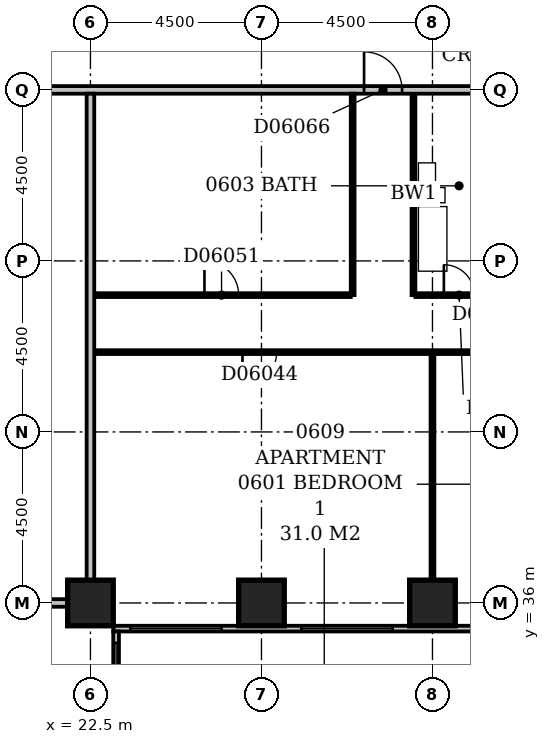
"""IFC4 building model, lengths in metres.
Left out: names, types, materials, properties, quantities, classifications, styles, units other than length and angle.
Written with IfcOpenShell. Run it as: python <this file> out.ifc"""

import sys

from ifc_helpers import new_model, si_unit, direction, frame, frame_2d, origin, origin_2d, place, context, subcontext, project, spatial, rectangle, extrude, element, fill, save


model = new_model("IFC4")
c1 = context("Model", 3, precision=1e-05, world=origin(), true_north=direction((0.0, 1.0)))
c2 = subcontext(c1, "Body", "Model", "MODEL_VIEW")
j1 = project(units=[si_unit("LENGTHUNIT", "METRE"), si_unit("PLANEANGLEUNIT", "RADIAN")], contexts=[c1])
p1 = place(None, origin())
s1 = spatial("IfcSite", under=j1, at=p1, CompositionType="ELEMENT")
p2 = place(p1, origin())
s2 = spatial("IfcBuilding", under=s1, at=p2, CompositionType="ELEMENT")
p3 = place(p2, frame((0.0, 0.0, 32.6)))
s3 = spatial("IfcBuildingStorey", under=s2, at=p3, CompositionType="ELEMENT", Elevation=32.6)
for number, where, z_axis, x_axis in (
    (1, (22.5, 36.0, -0.3), (0.0, 0.0, 1.0), (1.0, 0.0, 0.0)),
    (2, (27.0, 36.0, -0.3), (0.0, 0.0, 1.0), (1.0, 0.0, 0.0)),
    (3, (31.5, 36.0, -0.3), (0.0, 0.0, 1.0), (1.0, 0.0, 0.0)),
):
    element("IfcColumn", number, at=place(p3, frame(where, z_axis=z_axis, x_axis=x_axis)), inside=s3, PredefinedType="COLUMN", context=c2, shape_type="SweptSolid", body=[
        extrude(rectangle(XDim=1.2, YDim=1.2, at=origin_2d()), origin(), (0.0, 0.0, 1.0), 3.6),
    ])
p4 = place(p3, frame((23.175, 17.4, 0.0), z_axis=(0.0, 0.0, 1.0), x_axis=(0.0, 1.0, 0.0)))
e4 = element("IfcWall", 4, at=p4, inside=s3, PredefinedType="STANDARD", context=c2, shape_type="SweptSolid", body=[
    extrude(rectangle(XDim=17.85, YDim=0.15, at=frame_2d((8.925, 0.0))), origin(), (0.0, 0.0, 1.0), 2.7),
])
p5 = place(p4, frame((1.65, 0.0, 0.6)))
e5 = element("IfcOpeningElement", 5, at=p5, cuts=e4, PredefinedType="OPENING", context=c2, shape_type="SweptSolid", body=[
    extrude(rectangle(XDim=2.4, YDim=1.8, at=frame_2d((1.2, 0.9))), frame((0.0, 0.087, 0.0), z_axis=(0.0, -1.0, 0.0), x_axis=(1.0, 0.0, 0.0)), (0.0, 0.0, 1.0), 0.174),
])
p6 = place(p4, frame((6.15, 0.0, 0.6)))
e6 = element("IfcOpeningElement", 6, at=p6, cuts=e4, PredefinedType="OPENING", context=c2, shape_type="SweptSolid", body=[
    extrude(rectangle(XDim=2.4, YDim=1.8, at=frame_2d((1.2, 0.9))), frame((0.0, 0.087, 0.0), z_axis=(0.0, -1.0, 0.0), x_axis=(1.0, 0.0, 0.0)), (0.0, 0.0, 1.0), 0.174),
])
p7 = place(p4, frame((10.433, 0.0, 0.6)))
e7 = element("IfcOpeningElement", 7, at=p7, cuts=e4, PredefinedType="OPENING", context=c2, shape_type="SweptSolid", body=[
    extrude(rectangle(XDim=1.5, YDim=1.8, at=frame_2d((0.75, 0.9))), frame((0.0, 0.087, 0.0), z_axis=(0.0, -1.0, 0.0), x_axis=(1.0, 0.0, 0.0)), (0.0, 0.0, 1.0), 0.174),
])
p8 = place(p4, frame((15.15, 0.0, 0.6)))
e8 = element("IfcOpeningElement", 8, at=p8, cuts=e4, PredefinedType="OPENING", context=c2, shape_type="SweptSolid", body=[
    extrude(rectangle(XDim=2.4, YDim=1.8, at=frame_2d((1.2, 0.9))), frame((0.0, 0.087, 0.0), z_axis=(0.0, -1.0, 0.0), x_axis=(1.0, 0.0, 0.0)), (0.0, 0.0, 1.0), 0.174),
])
p9 = place(p3, frame((23.1, 35.325, 0.0), z_axis=(0.0, 0.0, 1.0), x_axis=(1.0, 0.0, 0.0)))
e9 = element("IfcWall", 9, at=p9, inside=s3, PredefinedType="STANDARD", context=c2, shape_type="SweptSolid", body=[
    extrude(rectangle(XDim=45.15, YDim=0.15, at=frame_2d((22.575, 0.0))), origin(), (0.0, 0.0, 1.0), 2.7),
])
p10 = place(p9, frame((0.45, 0.0, 0.6)))
e10 = element("IfcOpeningElement", 10, at=p10, cuts=e9, PredefinedType="OPENING", context=c2, shape_type="SweptSolid", body=[
    extrude(rectangle(XDim=2.4, YDim=1.8, at=frame_2d((1.2, 0.9))), frame((0.0, 0.087, 0.0), z_axis=(0.0, -1.0, 0.0), x_axis=(1.0, 0.0, 0.0)), (0.0, 0.0, 1.0), 0.174),
])
p11 = place(p9, frame((4.95, 0.0, 0.6)))
e11 = element("IfcOpeningElement", 11, at=p11, cuts=e9, PredefinedType="OPENING", context=c2, shape_type="SweptSolid", body=[
    extrude(rectangle(XDim=2.4, YDim=1.8, at=frame_2d((1.2, 0.9))), frame((0.0, 0.087, 0.0), z_axis=(0.0, -1.0, 0.0), x_axis=(1.0, 0.0, 0.0)), (0.0, 0.0, 1.0), 0.174),
])
p12 = place(p9, frame((10.583, 0.0, 0.6)))
e12 = element("IfcOpeningElement", 12, at=p12, cuts=e9, PredefinedType="OPENING", context=c2, shape_type="SweptSolid", body=[
    extrude(rectangle(XDim=1.5, YDim=1.8, at=frame_2d((0.75, 0.9))), frame((0.0, 0.087, 0.0), z_axis=(0.0, -1.0, 0.0), x_axis=(1.0, 0.0, 0.0)), (0.0, 0.0, 1.0), 0.174),
])
p13 = place(p9, frame((13.83, 0.0, 0.6)))
e13 = element("IfcOpeningElement", 13, at=p13, cuts=e9, PredefinedType="OPENING", context=c2, shape_type="SweptSolid", body=[
    extrude(rectangle(XDim=1.5, YDim=1.8, at=frame_2d((0.75, 0.9))), frame((0.0, 0.087, 0.0), z_axis=(0.0, -1.0, 0.0), x_axis=(1.0, 0.0, 0.0)), (0.0, 0.0, 1.0), 0.174),
])
p14 = place(p9, frame((18.45, 0.0, 0.6)))
e14 = element("IfcOpeningElement", 14, at=p14, cuts=e9, PredefinedType="OPENING", context=c2, shape_type="SweptSolid", body=[
    extrude(rectangle(XDim=2.4, YDim=1.8, at=frame_2d((1.2, 0.9))), frame((0.0, 0.087, 0.0), z_axis=(0.0, -1.0, 0.0), x_axis=(1.0, 0.0, 0.0)), (0.0, 0.0, 1.0), 0.174),
])
p15 = place(p9, frame((22.95, 0.0, 0.6)))
e15 = element("IfcOpeningElement", 15, at=p15, cuts=e9, PredefinedType="OPENING", context=c2, shape_type="SweptSolid", body=[
    extrude(rectangle(XDim=2.4, YDim=1.8, at=frame_2d((1.2, 0.9))), frame((0.0, 0.087, 0.0), z_axis=(0.0, -1.0, 0.0), x_axis=(1.0, 0.0, 0.0)), (0.0, 0.0, 1.0), 0.174),
])
p16 = place(p9, frame((27.45, 0.0, 0.6)))
e16 = element("IfcOpeningElement", 16, at=p16, cuts=e9, PredefinedType="OPENING", context=c2, shape_type="SweptSolid", body=[
    extrude(rectangle(XDim=2.4, YDim=1.8, at=frame_2d((1.2, 0.9))), frame((0.0, 0.087, 0.0), z_axis=(0.0, -1.0, 0.0), x_axis=(1.0, 0.0, 0.0)), (0.0, 0.0, 1.0), 0.174),
])
p17 = place(p9, frame((31.95, 0.0, 0.6)))
e17 = element("IfcOpeningElement", 17, at=p17, cuts=e9, PredefinedType="OPENING", context=c2, shape_type="SweptSolid", body=[
    extrude(rectangle(XDim=2.4, YDim=1.8, at=frame_2d((1.2, 0.9))), frame((0.0, 0.087, 0.0), z_axis=(0.0, -1.0, 0.0), x_axis=(1.0, 0.0, 0.0)), (0.0, 0.0, 1.0), 0.174),
])
p18 = place(p9, frame((36.297, 0.0, 0.6)))
e18 = element("IfcOpeningElement", 18, at=p18, cuts=e9, PredefinedType="OPENING", context=c2, shape_type="SweptSolid", body=[
    extrude(rectangle(XDim=2.1, YDim=1.8, at=frame_2d((1.05, 0.9))), frame((0.0, 0.087, 0.0), z_axis=(0.0, -1.0, 0.0), x_axis=(1.0, 0.0, 0.0)), (0.0, 0.0, 1.0), 0.174),
])
p19 = place(p9, frame((40.95, 0.0, 0.6)))
e19 = element("IfcOpeningElement", 19, at=p19, cuts=e9, PredefinedType="OPENING", context=c2, shape_type="SweptSolid", body=[
    extrude(rectangle(XDim=2.4, YDim=1.8, at=frame_2d((1.2, 0.9))), frame((0.0, 0.087, 0.0), z_axis=(0.0, -1.0, 0.0), x_axis=(1.0, 0.0, 0.0)), (0.0, 0.0, 1.0), 0.174),
])
p20 = place(p3, frame((9.1, 36.0, 0.0), z_axis=(0.0, 0.0, 1.0), x_axis=(1.0, 0.0, 0.0)))
e20 = element("IfcWall", 20, at=p20, inside=s3, PredefinedType="PARTITIONING", context=c2, shape_type="SweptSolid", body=[
    extrude(rectangle(XDim=12.8, YDim=0.2, at=frame_2d((6.4, 0.0))), origin(), (0.0, 0.0, 1.0), 2.4),
])
p21 = place(p3, frame((22.5, 36.6, 0.0), z_axis=(0.0, 0.0, 1.0), x_axis=(0.0, 1.0, 0.0)))
e21 = element("IfcWall", 21, at=p21, inside=s3, PredefinedType="PARTITIONING", context=c2, shape_type="SweptSolid", body=[
    extrude(rectangle(XDim=12.8, YDim=0.2, at=frame_2d((6.4, 0.0))), origin(), (0.0, 0.0, 1.0), 3.3),
])
p22 = place(p3, frame((31.5, 36.6, 0.0), z_axis=(0.0, 0.0, 1.0), x_axis=(0.0, 1.0, 0.0)))
e22 = element("IfcWall", 22, at=p22, inside=s3, PredefinedType="PARTITIONING", context=c2, shape_type="SweptSolid", body=[
    extrude(rectangle(XDim=5.95, YDim=0.1, at=frame_2d((2.975, 0.0))), origin(), (0.0, 0.0, 1.0), 3.3),
])
p23 = place(p3, frame((22.6, 42.6, 0.0), z_axis=(0.0, 0.0, 1.0), x_axis=(1.0, 0.0, 0.0)))
e23 = element("IfcWall", 23, at=p23, inside=s3, PredefinedType="PARTITIONING", context=c2, shape_type="SweptSolid", body=[
    extrude(rectangle(XDim=17.8, YDim=0.1, at=frame_2d((8.9, 0.0))), origin(), (0.0, 0.0, 1.0), 3.3),
])
p24 = place(p23, frame((3.9, 0.0, 0.0)))
e24 = element("IfcOpeningElement", 24, at=p24, cuts=e23, PredefinedType="OPENING", context=c2, shape_type="SweptSolid", body=[
    extrude(rectangle(XDim=0.9, YDim=2.1, at=frame_2d((0.45, 1.05))), frame((0.0, 0.062, 0.0), z_axis=(0.0, -1.0, 0.0), x_axis=(1.0, 0.0, 0.0)), (0.0, 0.0, 1.0), 0.124),
])
p25 = place(p23, frame((10.7, 0.0, 0.0)))
e25 = element("IfcOpeningElement", 25, at=p25, cuts=e23, PredefinedType="OPENING", context=c2, shape_type="SweptSolid", body=[
    extrude(rectangle(XDim=0.9, YDim=2.1, at=frame_2d((0.45, 1.05))), frame((0.0, 0.062, 0.0), z_axis=(0.0, -1.0, 0.0), x_axis=(1.0, 0.0, 0.0)), (0.0, 0.0, 1.0), 0.124),
])
p26 = place(p23, frame((14.05, 0.0, 0.0)))
e26 = element("IfcOpeningElement", 26, at=p26, cuts=e23, PredefinedType="OPENING", context=c2, shape_type="SweptSolid", body=[
    extrude(rectangle(XDim=0.9, YDim=2.1, at=frame_2d((0.45, 1.05))), frame((0.0, 0.062, 0.0), z_axis=(0.0, -1.0, 0.0), x_axis=(1.0, 0.0, 0.0)), (0.0, 0.0, 1.0), 0.124),
])
p27 = place(p3, frame((22.6, 44.1, 0.0), z_axis=(0.0, 0.0, 1.0), x_axis=(1.0, 0.0, 0.0)))
e27 = element("IfcWall", 27, at=p27, inside=s3, PredefinedType="PARTITIONING", context=c2, shape_type="SweptSolid", body=[
    extrude(rectangle(XDim=6.75, YDim=0.1, at=frame_2d((3.375, 0.0))), origin(), (0.0, 0.0, 1.0), 3.3),
])
p28 = place(p27, frame((2.9, 0.0, 0.0)))
e28 = element("IfcOpeningElement", 28, at=p28, cuts=e27, PredefinedType="OPENING", context=c2, shape_type="SweptSolid", body=[
    extrude(rectangle(XDim=0.9, YDim=2.1, at=frame_2d((0.45, 1.05))), frame((0.0, 0.062, 0.0), z_axis=(0.0, -1.0, 0.0), x_axis=(1.0, 0.0, 0.0)), (0.0, 0.0, 1.0), 0.124),
])
p29 = place(p3, frame((29.4, 44.1, 0.0), z_axis=(0.0, 0.0, 1.0), x_axis=(0.0, 1.0, 0.0)))
e29 = element("IfcWall", 29, at=p29, inside=s3, PredefinedType="PARTITIONING", context=c2, shape_type="SweptSolid", body=[
    extrude(rectangle(XDim=5.3, YDim=0.1, at=frame_2d((2.65, 0.0))), origin(), (0.0, 0.0, 1.0), 3.3),
])
p30 = place(p3, frame((31.0, 44.1, 0.0), z_axis=(0.0, 0.0, 1.0), x_axis=(0.0, 1.0, 0.0)))
e30 = element("IfcWall", 30, at=p30, inside=s3, PredefinedType="PLUMBINGWALL", context=c2, shape_type="SweptSolid", body=[
    extrude(rectangle(XDim=5.3, YDim=0.1, at=frame_2d((2.65, 0.0))), origin(), (0.0, 0.0, 1.0), 3.3),
])
p31 = place(p3, frame((31.05, 44.1, 0.0), z_axis=(0.0, 0.0, 1.0), x_axis=(1.0, 0.0, 0.0)))
e31 = element("IfcWall", 31, at=p31, inside=s3, PredefinedType="PARTITIONING", context=c2, shape_type="SweptSolid", body=[
    extrude(rectangle(XDim=9.35, YDim=0.1, at=frame_2d((4.675, 0.0))), origin(), (0.0, 0.0, 1.0), 3.3),
])
p32 = place(p31, frame((0.75, 0.0, 0.0)))
e32 = element("IfcOpeningElement", 32, at=p32, cuts=e31, PredefinedType="OPENING", context=c2, shape_type="SweptSolid", body=[
    extrude(rectangle(XDim=0.8, YDim=2.1, at=frame_2d((0.4, 1.05))), frame((0.0, 0.062, 0.0), z_axis=(0.0, -1.0, 0.0), x_axis=(1.0, 0.0, 0.0)), (0.0, 0.0, 1.0), 0.124),
])
p33 = place(p31, frame((8.05, 0.0, 0.0)))
e33 = element("IfcOpeningElement", 33, at=p33, cuts=e31, PredefinedType="OPENING", context=c2, shape_type="SweptSolid", body=[
    extrude(rectangle(XDim=0.8, YDim=2.1, at=frame_2d((0.4, 1.05))), frame((0.0, 0.062, 0.0), z_axis=(0.0, -1.0, 0.0), x_axis=(1.0, 0.0, 0.0)), (0.0, 0.0, 1.0), 0.124),
])
p34 = place(p31, frame((4.25, 0.0, 0.0)))
e34 = element("IfcOpeningElement", 34, at=p34, cuts=e31, PredefinedType="OPENING", context=c2, shape_type="SweptSolid", body=[
    extrude(rectangle(XDim=0.8, YDim=2.1, at=frame_2d((0.4, 1.05))), frame((0.0, 0.062, 0.0), z_axis=(0.0, -1.0, 0.0), x_axis=(1.0, 0.0, 0.0)), (0.0, 0.0, 1.0), 0.124),
])
p35 = place(p31, frame((6.05, 0.0, 0.0)))
e35 = element("IfcOpeningElement", 35, at=p35, cuts=e31, PredefinedType="OPENING", context=c2, shape_type="SweptSolid", body=[
    extrude(rectangle(XDim=0.8, YDim=2.1, at=frame_2d((0.4, 1.05))), frame((0.0, 0.062, 0.0), z_axis=(0.0, -1.0, 0.0), x_axis=(1.0, 0.0, 0.0)), (0.0, 0.0, 1.0), 0.124),
])
p36 = place(p31, frame((2.7, 0.0, 0.0)))
e36 = element("IfcOpeningElement", 36, at=p36, cuts=e31, PredefinedType="OPENING", context=c2, shape_type="SweptSolid", body=[
    extrude(rectangle(XDim=0.8, YDim=2.1, at=frame_2d((0.4, 1.05))), frame((0.0, 0.062, 0.0), z_axis=(0.0, -1.0, 0.0), x_axis=(1.0, 0.0, 0.0)), (0.0, 0.0, 1.0), 0.124),
])
p37 = place(p3, frame((9.1, 49.5, 0.0), z_axis=(0.0, 0.0, 1.0), x_axis=(1.0, 0.0, 0.0)))
e37 = element("IfcWall", 37, at=p37, inside=s3, PredefinedType="PARTITIONING", context=c2, shape_type="SweptSolid", body=[
    extrude(rectangle(XDim=57.8, YDim=0.2, at=frame_2d((28.9, 0.0))), origin(), (0.0, 0.0, 1.0), 3.3),
])
p38 = place(p37, frame((20.6, 0.0, 0.0)))
e38 = element("IfcOpeningElement", 38, at=p38, cuts=e37, PredefinedType="OPENING", context=c2, shape_type="SweptSolid", body=[
    extrude(rectangle(XDim=1.0, YDim=2.1, at=frame_2d((0.5, 1.05))), frame((0.0, 0.112, 0.0), z_axis=(0.0, -1.0, 0.0), x_axis=(1.0, 0.0, 0.0)), (0.0, 0.0, 1.0), 0.224),
])
p39 = place(p37, frame((31.7, 0.0, 0.0)))
e39 = element("IfcOpeningElement", 39, at=p39, cuts=e37, PredefinedType="OPENING", context=c2, shape_type="SweptSolid", body=[
    extrude(rectangle(XDim=1.0, YDim=2.1, at=frame_2d((0.5, 1.05))), frame((0.0, 0.112, 0.0), z_axis=(0.0, -1.0, 0.0), x_axis=(1.0, 0.0, 0.0)), (0.0, 0.0, 1.0), 0.224),
])
p40 = place(p37, frame((47.6, 0.0, 0.0)))
e40 = element("IfcOpeningElement", 40, at=p40, cuts=e37, PredefinedType="OPENING", context=c2, shape_type="SweptSolid", body=[
    extrude(rectangle(XDim=1.0, YDim=2.1, at=frame_2d((0.5, 1.05))), frame((0.0, 0.112, 0.0), z_axis=(0.0, -1.0, 0.0), x_axis=(1.0, 0.0, 0.0)), (0.0, 0.0, 1.0), 0.224),
])
p41 = place(p37, frame((54.15, 0.0, 0.0)))
e41 = element("IfcOpeningElement", 41, at=p41, cuts=e37, PredefinedType="OPENING", context=c2, shape_type="SweptSolid", body=[
    extrude(rectangle(XDim=1.0, YDim=2.1, at=frame_2d((0.5, 1.05))), frame((0.0, 0.112, 0.0), z_axis=(0.0, -1.0, 0.0), x_axis=(1.0, 0.0, 0.0)), (0.0, 0.0, 1.0), 0.224),
])
p42 = place(p37, frame((10.65, 0.0, 0.0)))
e42 = element("IfcOpeningElement", 42, at=p42, cuts=e37, PredefinedType="OPENING", context=c2, shape_type="SweptSolid", body=[
    extrude(rectangle(XDim=0.9, YDim=2.1, at=frame_2d((0.45, 1.05))), frame((0.0, 0.112, 0.0), z_axis=(0.0, -1.0, 0.0), x_axis=(1.0, 0.0, 0.0)), (0.0, 0.0, 1.0), 0.224),
])
p43 = place(p8, origin())
e43 = element("IfcWindow", 43, at=p43, inside=s3, PartitioningType="SINGLE_PANEL", PredefinedType="WINDOW", context=c2, shape_type="SweptSolid", body=[
    extrude(rectangle(XDim=2.4, YDim=1.8, at=frame_2d((1.2, 0.9))), frame((0.0, 0.03, 0.0), z_axis=(0.0, -1.0, 0.0), x_axis=(1.0, 0.0, 0.0)), (0.0, 0.0, 1.0), 0.06),
])
fill(e8, e43)
p44 = place(p10, origin())
e44 = element("IfcWindow", 44, at=p44, inside=s3, PartitioningType="SINGLE_PANEL", PredefinedType="WINDOW", context=c2, shape_type="SweptSolid", body=[
    extrude(rectangle(XDim=2.4, YDim=1.8, at=frame_2d((1.2, 0.9))), frame((0.0, 0.03, 0.0), z_axis=(0.0, -1.0, 0.0), x_axis=(1.0, 0.0, 0.0)), (0.0, 0.0, 1.0), 0.06),
])
fill(e10, e44)
p45 = place(p11, origin())
e45 = element("IfcWindow", 45, at=p45, inside=s3, PartitioningType="SINGLE_PANEL", PredefinedType="WINDOW", context=c2, shape_type="SweptSolid", body=[
    extrude(rectangle(XDim=2.4, YDim=1.8, at=frame_2d((1.2, 0.9))), frame((0.0, 0.03, 0.0), z_axis=(0.0, -1.0, 0.0), x_axis=(1.0, 0.0, 0.0)), (0.0, 0.0, 1.0), 0.06),
])
fill(e11, e45)
p46 = place(p24, frame((0.9, 0.0, 0.0), z_axis=(0.0, 0.0, 1.0), x_axis=(-1.0, 0.0, 0.0)))
e46 = element("IfcDoor", 46, at=p46, inside=s3, OperationType="SINGLE_SWING_RIGHT", PredefinedType="DOOR", context=c2, shape_type="SweptSolid", body=[
    extrude(rectangle(XDim=0.9, YDim=2.1, at=frame_2d((0.45, 1.05))), frame((0.0, 0.025, 0.0), z_axis=(0.0, -1.0, 0.0), x_axis=(1.0, 0.0, 0.0)), (0.0, 0.0, 1.0), 0.05),
])
fill(e24, e46)
p47 = place(p28, origin())
e47 = element("IfcDoor", 47, at=p47, inside=s3, OperationType="SINGLE_SWING_LEFT", PredefinedType="DOOR", context=c2, shape_type="SweptSolid", body=[
    extrude(rectangle(XDim=0.9, YDim=2.1, at=frame_2d((0.45, 1.05))), frame((0.0, 0.025, 0.0), z_axis=(0.0, -1.0, 0.0), x_axis=(1.0, 0.0, 0.0)), (0.0, 0.0, 1.0), 0.05),
])
fill(e28, e47)
p48 = place(p32, origin())
e48 = element("IfcDoor", 48, at=p48, inside=s3, OperationType="SINGLE_SWING_LEFT", PredefinedType="DOOR", context=c2, shape_type="SweptSolid", body=[
    extrude(rectangle(XDim=0.8, YDim=2.1, at=frame_2d((0.4, 1.05))), frame((0.0, 0.025, 0.0), z_axis=(0.0, -1.0, 0.0), x_axis=(1.0, 0.0, 0.0)), (0.0, 0.0, 1.0), 0.05),
])
fill(e32, e48)
p49 = place(p38, origin())
e49 = element("IfcDoor", 49, at=p49, inside=s3, OperationType="SINGLE_SWING_LEFT", PredefinedType="DOOR", context=c2, shape_type="SweptSolid", body=[
    extrude(rectangle(XDim=1.0, YDim=2.1, at=frame_2d((0.5, 1.05))), frame((0.0, 0.025, 0.0), z_axis=(0.0, -1.0, 0.0), x_axis=(1.0, 0.0, 0.0)), (0.0, 0.0, 1.0), 0.05),
])
fill(e38, e49)
save(model, sys.argv[1])
